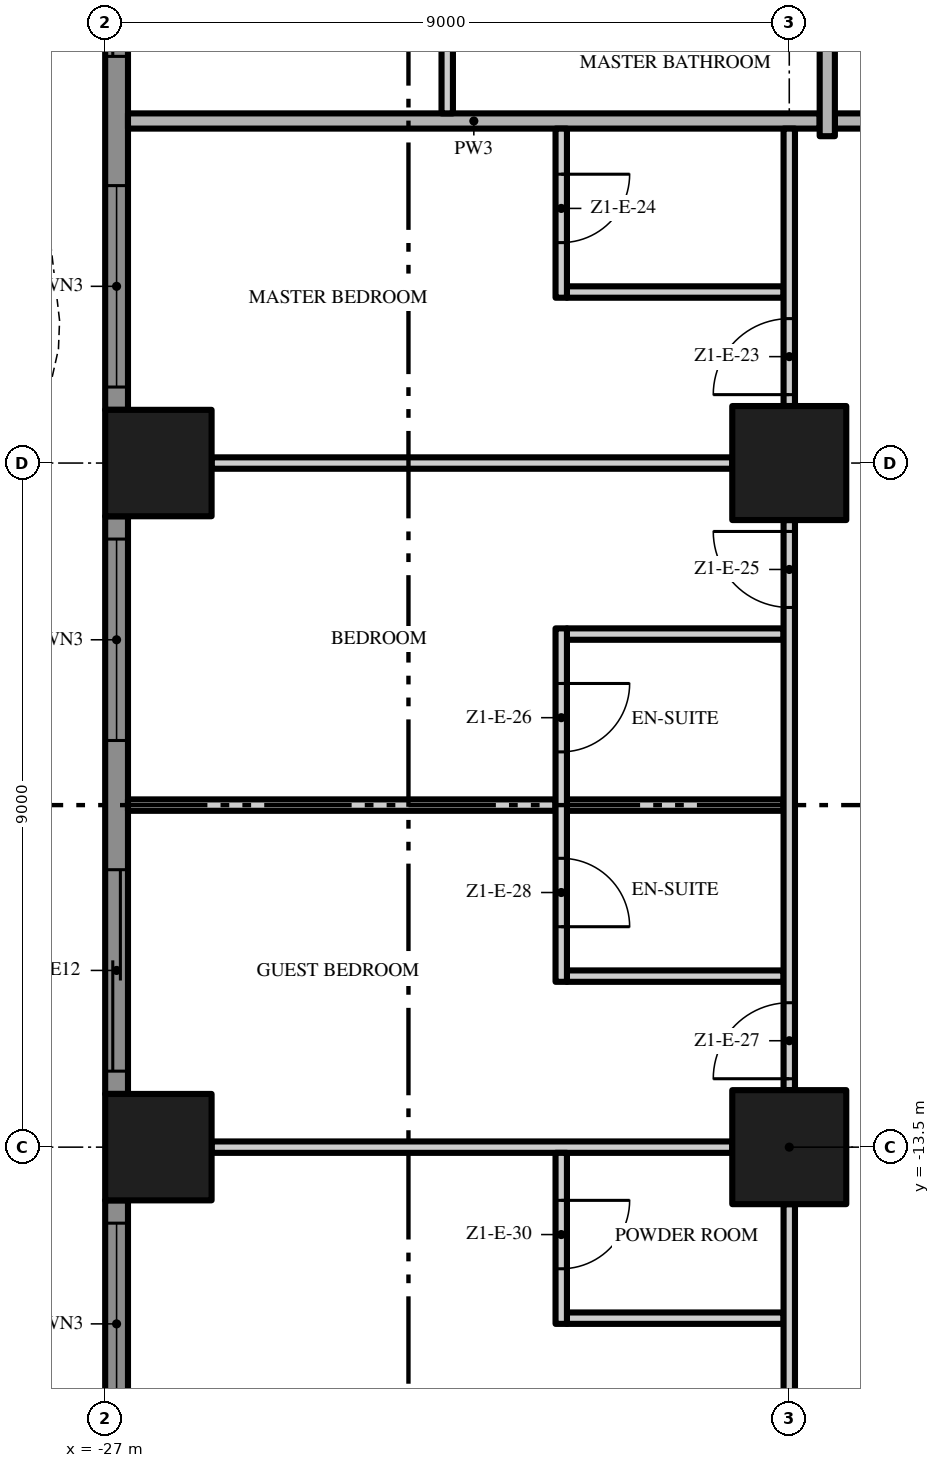
"""IFC4 building model, lengths in metres.
Left out: names, types, materials, properties, quantities, classifications, styles, units other than length and angle.
Written with IfcOpenShell. Run it as: python <this file> out.ifc"""

import sys

from ifc_helpers import new_model, si_unit, direction, frame, frame_2d, origin, origin_2d, place, context, subcontext, project, spatial, polyline, rectangle, outline, extrude, element, fill, save


model = new_model("IFC4")
c1 = context("Model", 3, precision=1e-05, world=origin(), true_north=direction((0.0, 1.0)))
c2 = subcontext(c1, "Body", "Model", "MODEL_VIEW")
j1 = project(units=[si_unit("LENGTHUNIT", "METRE"), si_unit("PLANEANGLEUNIT", "RADIAN")], contexts=[c1])
p1 = place(None, origin())
s1 = spatial("IfcSite", under=j1, at=p1, CompositionType="ELEMENT")
p2 = place(p1, origin())
s2 = spatial("IfcBuilding", under=s1, at=p2, CompositionType="ELEMENT")
p3 = place(p2, frame((0.0, 0.0, 56.8)))
s3 = spatial("IfcBuildingStorey", under=s2, at=p3, CompositionType="ELEMENT", Elevation=56.8)
for number, where, z_axis, x_axis in (
    (1, (-18.0, -13.5, 0.0), (0.0, 0.0, 1.0), (1.0, 0.0, 0.0)),
    (2, (-18.0, -4.5, 0.0), (0.0, 0.0, 1.0), (1.0, 0.0, 0.0)),
):
    element("IfcColumn", number, at=place(p3, frame(where, z_axis=z_axis, x_axis=x_axis)), inside=s3, PredefinedType="COLUMN", context=c2, shape_type="SweptSolid", body=[
        extrude(rectangle(XDim=1.5, YDim=1.5, at=origin_2d()), origin(), (0.0, 0.0, 1.0), 3.5),
    ])
for number, where, z_axis, x_axis in (
    (3, (-26.3, -13.5, 0.0), (0.0, 0.0, 1.0), (1.0, 0.0, 0.0)),
    (4, (-26.3, -4.5, 0.0), (0.0, 0.0, 1.0), (1.0, 0.0, 0.0)),
):
    element("IfcColumn", number, at=place(p3, frame(where, z_axis=z_axis, x_axis=x_axis)), inside=s3, PredefinedType="COLUMN", context=c2, shape_type="SweptSolid", body=[
        extrude(rectangle(XDim=1.4, YDim=1.4, at=origin_2d()), origin(), (0.0, 0.0, 1.0), 3.5),
    ])
p4 = place(p3, frame((-26.85, -3.8, 0.0), z_axis=(0.0, 0.0, 1.0), x_axis=(0.0, 1.0, 0.0)))
e5 = element("IfcWall", 5, at=p4, inside=s3, PredefinedType="SOLIDWALL", context=c2, shape_type="SweptSolid", body=[
    extrude(rectangle(XDim=7.6, YDim=0.3, at=frame_2d((3.8, 0.0))), origin(), (0.0, 0.0, 1.0), 3.5),
])
p5 = place(p4, frame((4.65, 0.0, 0.0)))
e6 = element("IfcOpeningElement", 6, at=p5, cuts=e5, PredefinedType="OPENING", context=c2, shape_type="SweptSolid", body=[
    extrude(rectangle(XDim=2.65, YDim=2.4, at=frame_2d((1.325, 1.2))), frame((0.0, 0.16, 0.0), z_axis=(0.0, -1.0, 0.0), x_axis=(1.0, 0.0, 0.0)), (0.0, 0.0, 1.0), 0.32),
])
p6 = place(p4, frame((0.3, 0.0, 0.45)))
e7 = element("IfcOpeningElement", 7, at=p6, cuts=e5, PredefinedType="OPENING", context=c2, shape_type="SweptSolid", body=[
    extrude(rectangle(XDim=2.65, YDim=2.65, at=frame_2d((1.325, 1.325))), frame((0.0, 0.16, 0.0), z_axis=(0.0, -1.0, 0.0), x_axis=(1.0, 0.0, 0.0)), (0.0, 0.0, 1.0), 0.32),
])
p7 = place(p3, frame((-26.85, -12.8, 0.0), z_axis=(0.0, 0.0, 1.0), x_axis=(0.0, 1.0, 0.0)))
e8 = element("IfcWall", 8, at=p7, inside=s3, PredefinedType="SOLIDWALL", context=c2, shape_type="SweptSolid", body=[
    extrude(rectangle(XDim=7.6, YDim=0.3, at=frame_2d((3.8, 0.0))), origin(), (0.0, 0.0, 1.0), 3.5),
])
p8 = place(p7, frame((4.65, 0.0, 0.45)))
e9 = element("IfcOpeningElement", 9, at=p8, cuts=e8, PredefinedType="OPENING", context=c2, shape_type="SweptSolid", body=[
    extrude(rectangle(XDim=2.65, YDim=2.65, at=frame_2d((1.325, 1.325))), frame((0.0, 0.16, 0.0), z_axis=(0.0, -1.0, 0.0), x_axis=(1.0, 0.0, 0.0)), (0.0, 0.0, 1.0), 0.32),
])
p9 = place(p7, frame((0.3, 0.0, 0.0)))
e10 = element("IfcOpeningElement", 10, at=p9, cuts=e8, PredefinedType="OPENING", context=c2, shape_type="SweptSolid", body=[
    extrude(rectangle(XDim=2.65, YDim=2.4, at=frame_2d((1.325, 1.2))), frame((0.0, 0.16, 0.0), z_axis=(0.0, -1.0, 0.0), x_axis=(1.0, 0.0, 0.0)), (0.0, 0.0, 1.0), 0.32),
])
p10 = place(p3, frame((-26.85, -18.0, 0.0), z_axis=(0.0, 0.0, 1.0), x_axis=(0.0, 1.0, 0.0)))
e11 = element("IfcWall", 11, at=p10, inside=s3, PredefinedType="SOLIDWALL", context=c2, shape_type="SweptSolid", body=[
    extrude(rectangle(XDim=3.8, YDim=0.3, at=frame_2d((1.9, 0.0))), origin(), (0.0, 0.0, 1.0), 3.5),
])
p11 = place(p10, frame((0.85, 0.0, 0.45)))
e12 = element("IfcOpeningElement", 12, at=p11, cuts=e11, PredefinedType="OPENING", context=c2, shape_type="SweptSolid", body=[
    extrude(rectangle(XDim=2.65, YDim=2.65, at=frame_2d((1.325, 1.325))), frame((0.0, 0.16, 0.0), z_axis=(0.0, -1.0, 0.0), x_axis=(1.0, 0.0, 0.0)), (0.0, 0.0, 1.0), 0.32),
])
p12 = place(p3, origin())
e13 = element("IfcWall", 13, at=p12, inside=s3, PredefinedType="USERDEFINED", context=c2, shape_type="SweptSolid", body=[
    extrude(outline(polyline([(-29.649, 18.0), (-28.988, 16.5), (-28.255, 15.0), (-27.731, 13.5), (-27.6, 12.375), (-27.615, 12.0), (-27.951, 10.5), (-28.612, 9.0), (-29.345, 7.5), (-29.869, 6.0), (-30.0, 4.875), (-29.985, 4.5), (-29.649, 3.0), (-28.988, 1.5), (-28.255, 0.0), (-27.731, -1.5), (-27.6, -2.625), (-27.615, -3.0), (-27.951, -4.5), (-28.612, -6.0), (-29.345, -7.5), (-29.869, -9.0), (-30.0, -10.125), (-29.985, -10.5), (-29.649, -12.0), (-28.988, -13.5), (-28.255, -15.0), (-27.731, -16.5), (-27.6, -17.625), (-27.615, -18.0), (-27.365, -18.01), (-27.349, -17.615), (-27.486, -16.444), (-28.024, -14.904), (-28.761, -13.395), (-29.41, -11.921), (-29.736, -10.467), (-29.749, -10.135), (-29.624, -9.056), (-29.114, -7.596), (-28.385, -6.105), (-27.713, -4.579), (-27.366, -3.033), (-27.349, -2.615), (-27.486, -1.444), (-28.024, 0.096), (-28.761, 1.605), (-29.41, 3.079), (-29.736, 4.533), (-29.749, 4.865), (-29.624, 5.944), (-29.114, 7.404), (-28.385, 8.895), (-27.713, 10.421), (-27.366, 11.967), (-27.349, 12.385), (-27.486, 13.556), (-28.024, 15.096), (-28.761, 16.605), (-29.42, 18.101), (-29.649, 18.0)])), origin(), (0.0, 0.0, 1.0), 0.9),
])
p13 = place(p3, frame((-20.925, -15.75, 0.0), z_axis=(0.0, 0.0, 1.0), x_axis=(1.0, 0.0, 0.0)))
e14 = element("IfcWall", 14, at=p13, inside=s3, PredefinedType="PARTITIONING", context=c2, shape_type="SweptSolid", body=[
    extrude(rectangle(XDim=2.85, YDim=0.15, at=frame_2d((1.425, 0.0))), origin(), (0.0, 0.0, 1.0), 3.5),
])
p14 = place(p3, frame((-25.6, -13.5, 0.0), z_axis=(0.0, 0.0, 1.0), x_axis=(1.0, 0.0, 0.0)))
e15 = element("IfcWall", 15, at=p14, inside=s3, PredefinedType="PARTITIONING", context=c2, shape_type="SweptSolid", body=[
    extrude(rectangle(XDim=6.85, YDim=0.15, at=frame_2d((3.425, 0.0))), origin(), (0.0, 0.0, 1.0), 3.5),
])
p15 = place(p3, frame((-20.925, -11.25, 0.0), z_axis=(0.0, 0.0, 1.0), x_axis=(1.0, 0.0, 0.0)))
e16 = element("IfcWall", 16, at=p15, inside=s3, PredefinedType="PARTITIONING", context=c2, shape_type="SweptSolid", body=[
    extrude(rectangle(XDim=2.85, YDim=0.15, at=frame_2d((1.425, 0.0))), origin(), (0.0, 0.0, 1.0), 3.5),
])
p16 = place(p3, frame((-26.7, -9.0, 0.0), z_axis=(0.0, 0.0, 1.0), x_axis=(1.0, 0.0, 0.0)))
e17 = element("IfcWall", 17, at=p16, inside=s3, PredefinedType="PARTITIONING", context=c2, shape_type="SweptSolid", body=[
    extrude(rectangle(XDim=5.625, YDim=0.15, at=frame_2d((2.812, 0.0))), origin(), (0.0, 0.0, 1.0), 3.5),
])
for number, where, z_axis, x_axis in (
    (18, (-20.925, -9.0, 0.0), (0.0, 0.0, 1.0), (1.0, 0.0, 0.0)),
    (19, (-20.925, -6.75, 0.0), (0.0, 0.0, 1.0), (1.0, 0.0, 0.0)),
):
    element("IfcWall", number, at=place(p3, frame(where, z_axis=z_axis, x_axis=x_axis)), inside=s3, PredefinedType="PARTITIONING", context=c2, shape_type="SweptSolid", body=[
        extrude(rectangle(XDim=2.85, YDim=0.15, at=frame_2d((1.425, 0.0))), origin(), (0.0, 0.0, 1.0), 3.5),
    ])
p17 = place(p3, frame((-25.6, -4.5, 0.0), z_axis=(0.0, 0.0, 1.0), x_axis=(1.0, 0.0, 0.0)))
e20 = element("IfcWall", 20, at=p17, inside=s3, PredefinedType="PARTITIONING", context=c2, shape_type="SweptSolid", body=[
    extrude(rectangle(XDim=6.85, YDim=0.15, at=frame_2d((3.425, 0.0))), origin(), (0.0, 0.0, 1.0), 3.5),
])
p18 = place(p3, frame((-20.925, -2.25, 0.0), z_axis=(0.0, 0.0, 1.0), x_axis=(1.0, 0.0, 0.0)))
e21 = element("IfcWall", 21, at=p18, inside=s3, PredefinedType="PARTITIONING", context=c2, shape_type="SweptSolid", body=[
    extrude(rectangle(XDim=2.85, YDim=0.15, at=frame_2d((1.425, 0.0))), origin(), (0.0, 0.0, 1.0), 3.5),
])
p19 = place(p3, frame((-17.4, 0.0, 0.0), z_axis=(0.0, 0.0, 1.0), x_axis=(1.0, 0.0, 0.0)))
e22 = element("IfcWall", 22, at=p19, inside=s3, PredefinedType="PARTITIONING", context=c2, shape_type="SweptSolid", body=[
    extrude(rectangle(XDim=12.8, YDim=0.2, at=frame_2d((6.4, 0.0))), origin(), (0.0, 0.0, 1.0), 3.5),
])
p20 = place(p3, frame((-26.7, 0.0, 0.0), z_axis=(0.0, 0.0, 1.0), x_axis=(1.0, 0.0, 0.0)))
e23 = element("IfcWall", 23, at=p20, inside=s3, PredefinedType="PARTITIONING", context=c2, shape_type="SweptSolid", body=[
    extrude(rectangle(XDim=9.1, YDim=0.2, at=frame_2d((4.55, 0.0))), origin(), (0.0, 0.0, 1.0), 3.5),
])
p21 = place(p3, frame((-22.5, 0.1, 0.0), z_axis=(0.0, 0.0, 1.0), x_axis=(0.0, 1.0, 0.0)))
e24 = element("IfcWall", 24, at=p21, inside=s3, PredefinedType="PARTITIONING", context=c2, shape_type="SweptSolid", body=[
    extrude(rectangle(XDim=17.2, YDim=0.15, at=frame_2d((8.6, 0.0))), origin(), (0.0, 0.0, 1.0), 3.5),
])
p22 = place(p21, frame((1.65, 0.0, 0.0)))
e25 = element("IfcOpeningElement", 25, at=p22, cuts=e24, PredefinedType="OPENING", context=c2, shape_type="SweptSolid", body=[
    extrude(rectangle(XDim=1.0, YDim=2.4, at=frame_2d((0.5, 1.2))), frame((0.0, 0.085, 0.0), z_axis=(0.0, -1.0, 0.0), x_axis=(1.0, 0.0, 0.0)), (0.0, 0.0, 1.0), 0.17),
])
p23 = place(p21, frame((5.0, 0.0, 0.0)))
e26 = element("IfcOpeningElement", 26, at=p23, cuts=e24, PredefinedType="OPENING", context=c2, shape_type="SweptSolid", body=[
    extrude(rectangle(XDim=1.0, YDim=2.4, at=frame_2d((0.5, 1.2))), frame((0.0, 0.085, 0.0), z_axis=(0.0, -1.0, 0.0), x_axis=(1.0, 0.0, 0.0)), (0.0, 0.0, 1.0), 0.17),
])
p24 = place(p21, frame((13.25, 0.0, 0.0)))
e27 = element("IfcOpeningElement", 27, at=p24, cuts=e24, PredefinedType="OPENING", context=c2, shape_type="SweptSolid", body=[
    extrude(rectangle(XDim=1.8, YDim=2.4, at=frame_2d((0.9, 1.2))), frame((0.0, 0.085, 0.0), z_axis=(0.0, -1.0, 0.0), x_axis=(1.0, 0.0, 0.0)), (0.0, 0.0, 1.0), 0.17),
])
p25 = place(p3, frame((-21.0, -13.575, 0.0), z_axis=(0.0, 0.0, 1.0), x_axis=(0.0, -1.0, 0.0)))
e28 = element("IfcWall", 28, at=p25, inside=s3, PredefinedType="PARTITIONING", context=c2, shape_type="SweptSolid", body=[
    extrude(rectangle(XDim=2.25, YDim=0.15, at=frame_2d((1.125, 0.0))), origin(), (0.0, 0.0, 1.0), 3.5),
])
p26 = place(p25, frame((0.625, 0.0, 0.0)))
e29 = element("IfcOpeningElement", 29, at=p26, cuts=e28, PredefinedType="OPENING", context=c2, shape_type="SweptSolid", body=[
    extrude(rectangle(XDim=0.9, YDim=2.1, at=frame_2d((0.45, 1.05))), frame((0.0, 0.085, 0.0), z_axis=(0.0, -1.0, 0.0), x_axis=(1.0, 0.0, 0.0)), (0.0, 0.0, 1.0), 0.17),
])
p27 = place(p3, frame((-21.0, -6.675, 0.0), z_axis=(0.0, 0.0, 1.0), x_axis=(0.0, -1.0, 0.0)))
e30 = element("IfcWall", 30, at=p27, inside=s3, PredefinedType="PARTITIONING", context=c2, shape_type="SweptSolid", body=[
    extrude(rectangle(XDim=4.65, YDim=0.15, at=frame_2d((2.325, 0.0))), origin(), (0.0, 0.0, 1.0), 3.5),
])
p28 = place(p27, frame((0.725, 0.0, 0.0)))
e31 = element("IfcOpeningElement", 31, at=p28, cuts=e30, PredefinedType="OPENING", context=c2, shape_type="SweptSolid", body=[
    extrude(rectangle(XDim=0.9, YDim=2.1, at=frame_2d((0.45, 1.05))), frame((0.0, 0.085, 0.0), z_axis=(0.0, -1.0, 0.0), x_axis=(1.0, 0.0, 0.0)), (0.0, 0.0, 1.0), 0.17),
])
p29 = place(p27, frame((3.025, 0.0, 0.0)))
e32 = element("IfcOpeningElement", 32, at=p29, cuts=e30, PredefinedType="OPENING", context=c2, shape_type="SweptSolid", body=[
    extrude(rectangle(XDim=0.9, YDim=2.1, at=frame_2d((0.45, 1.05))), frame((0.0, 0.085, 0.0), z_axis=(0.0, -1.0, 0.0), x_axis=(1.0, 0.0, 0.0)), (0.0, 0.0, 1.0), 0.17),
])
p30 = place(p3, frame((-21.0, -0.1, 0.0), z_axis=(0.0, 0.0, 1.0), x_axis=(0.0, -1.0, 0.0)))
e33 = element("IfcWall", 33, at=p30, inside=s3, PredefinedType="PARTITIONING", context=c2, shape_type="SweptSolid", body=[
    extrude(rectangle(XDim=2.225, YDim=0.15, at=frame_2d((1.113, 0.0))), origin(), (0.0, 0.0, 1.0), 3.5),
])
p31 = place(p30, frame((0.6, 0.0, 0.0)))
e34 = element("IfcOpeningElement", 34, at=p31, cuts=e33, PredefinedType="OPENING", context=c2, shape_type="SweptSolid", body=[
    extrude(rectangle(XDim=0.9, YDim=2.1, at=frame_2d((0.45, 1.05))), frame((0.0, 0.085, 0.0), z_axis=(0.0, -1.0, 0.0), x_axis=(1.0, 0.0, 0.0)), (0.0, 0.0, 1.0), 0.17),
])
p32 = place(p3, frame((-18.0, -21.1, 0.0), z_axis=(0.0, 0.0, 1.0), x_axis=(0.0, 1.0, 0.0)))
e35 = element("IfcWall", 35, at=p32, inside=s3, PredefinedType="PARTITIONING", context=c2, shape_type="SweptSolid", body=[
    extrude(rectangle(XDim=6.85, YDim=0.15, at=frame_2d((3.425, 0.0))), origin(), (0.0, 0.0, 1.0), 3.5),
])
p33 = place(p32, frame((1.1, 0.0, 0.0)))
e36 = element("IfcOpeningElement", 36, at=p33, cuts=e35, PredefinedType="OPENING", context=c2, shape_type="SweptSolid", body=[
    extrude(rectangle(XDim=1.8, YDim=2.4, at=frame_2d((0.9, 1.2))), frame((0.0, 0.085, 0.0), z_axis=(0.0, -1.0, 0.0), x_axis=(1.0, 0.0, 0.0)), (0.0, 0.0, 1.0), 0.17),
])
p34 = place(p3, frame((-18.0, -12.75, 0.0), z_axis=(0.0, 0.0, 1.0), x_axis=(0.0, 1.0, 0.0)))
e37 = element("IfcWall", 37, at=p34, inside=s3, PredefinedType="PARTITIONING", context=c2, shape_type="SweptSolid", body=[
    extrude(rectangle(XDim=7.5, YDim=0.15, at=frame_2d((3.75, 0.0))), origin(), (0.0, 0.0, 1.0), 3.5),
])
p35 = place(p34, frame((6.35, 0.0, 0.0)))
e38 = element("IfcOpeningElement", 38, at=p35, cuts=e37, PredefinedType="OPENING", context=c2, shape_type="SweptSolid", body=[
    extrude(rectangle(XDim=1.0, YDim=2.4, at=frame_2d((0.5, 1.2))), frame((0.0, 0.085, 0.0), z_axis=(0.0, -1.0, 0.0), x_axis=(1.0, 0.0, 0.0)), (0.0, 0.0, 1.0), 0.17),
])
p36 = place(p34, frame((0.15, 0.0, 0.0)))
e39 = element("IfcOpeningElement", 39, at=p36, cuts=e37, PredefinedType="OPENING", context=c2, shape_type="SweptSolid", body=[
    extrude(rectangle(XDim=1.0, YDim=2.4, at=frame_2d((0.5, 1.2))), frame((0.0, 0.085, 0.0), z_axis=(0.0, -1.0, 0.0), x_axis=(1.0, 0.0, 0.0)), (0.0, 0.0, 1.0), 0.17),
])
p37 = place(p3, frame((-18.0, -3.75, 0.0), z_axis=(0.0, 0.0, 1.0), x_axis=(0.0, 1.0, 0.0)))
e40 = element("IfcWall", 40, at=p37, inside=s3, PredefinedType="PARTITIONING", context=c2, shape_type="SweptSolid", body=[
    extrude(rectangle(XDim=3.65, YDim=0.15, at=frame_2d((1.825, 0.0))), origin(), (0.0, 0.0, 1.0), 3.5),
])
p38 = place(p37, frame((0.15, 0.0, 0.0)))
e41 = element("IfcOpeningElement", 41, at=p38, cuts=e40, PredefinedType="OPENING", context=c2, shape_type="SweptSolid", body=[
    extrude(rectangle(XDim=1.0, YDim=2.4, at=frame_2d((0.5, 1.2))), frame((0.0, 0.085, 0.0), z_axis=(0.0, -1.0, 0.0), x_axis=(1.0, 0.0, 0.0)), (0.0, 0.0, 1.0), 0.17),
])
p39 = place(p3, frame((-17.5, -0.2, 0.0), z_axis=(0.0, 0.0, 1.0), x_axis=(0.0, 1.0, 0.0)))
e42 = element("IfcWall", 42, at=p39, inside=s3, PredefinedType="PARTITIONING", context=c2, shape_type="SweptSolid", body=[
    extrude(rectangle(XDim=3.95, YDim=0.2, at=frame_2d((1.975, 0.0))), origin(), (0.0, 0.0, 1.0), 3.5),
])
p40 = place(p5, origin())
e43 = element("IfcDoor", 43, at=p40, inside=s3, OperationType="SINGLE_SWING_LEFT", PredefinedType="DOOR", context=c2, shape_type="SweptSolid", body=[
    extrude(rectangle(XDim=2.65, YDim=2.4, at=frame_2d((1.325, 1.2))), frame((0.0, 0.025, 0.0), z_axis=(0.0, -1.0, 0.0), x_axis=(1.0, 0.0, 0.0)), (0.0, 0.0, 1.0), 0.05),
])
fill(e6, e43)
p41 = place(p6, origin())
e44 = element("IfcWindow", 44, at=p41, inside=s3, PartitioningType="SINGLE_PANEL", PredefinedType="WINDOW", context=c2, shape_type="SweptSolid", body=[
    extrude(rectangle(XDim=2.65, YDim=2.65, at=frame_2d((1.325, 1.325))), frame((0.0, 0.03, 0.0), z_axis=(0.0, -1.0, 0.0), x_axis=(1.0, 0.0, 0.0)), (0.0, 0.0, 1.0), 0.06),
])
fill(e7, e44)
p42 = place(p8, origin())
e45 = element("IfcWindow", 45, at=p42, inside=s3, PartitioningType="SINGLE_PANEL", PredefinedType="WINDOW", context=c2, shape_type="SweptSolid", body=[
    extrude(rectangle(XDim=2.65, YDim=2.65, at=frame_2d((1.325, 1.325))), frame((0.0, 0.03, 0.0), z_axis=(0.0, -1.0, 0.0), x_axis=(1.0, 0.0, 0.0)), (0.0, 0.0, 1.0), 0.06),
])
fill(e9, e45)
p43 = place(p9, origin())
e46 = element("IfcDoor", 46, at=p43, inside=s3, OperationType="SINGLE_SWING_LEFT", PredefinedType="DOOR", context=c2, shape_type="SweptSolid", body=[
    extrude(rectangle(XDim=2.65, YDim=2.4, at=frame_2d((1.325, 1.2))), frame((0.0, 0.025, 0.0), z_axis=(0.0, -1.0, 0.0), x_axis=(1.0, 0.0, 0.0)), (0.0, 0.0, 1.0), 0.05),
])
fill(e10, e46)
p44 = place(p11, origin())
e47 = element("IfcWindow", 47, at=p44, inside=s3, PartitioningType="SINGLE_PANEL", PredefinedType="WINDOW", context=c2, shape_type="SweptSolid", body=[
    extrude(rectangle(XDim=2.65, YDim=2.65, at=frame_2d((1.325, 1.325))), frame((0.0, 0.03, 0.0), z_axis=(0.0, -1.0, 0.0), x_axis=(1.0, 0.0, 0.0)), (0.0, 0.0, 1.0), 0.06),
])
fill(e12, e47)
p45 = place(p38, origin())
e48 = element("IfcDoor", 48, at=p45, inside=s3, OperationType="SINGLE_SWING_LEFT", PredefinedType="DOOR", context=c2, shape_type="SweptSolid", body=[
    extrude(rectangle(XDim=1.0, YDim=2.4, at=frame_2d((0.5, 1.2))), frame((0.0, 0.025, 0.0), z_axis=(0.0, -1.0, 0.0), x_axis=(1.0, 0.0, 0.0)), (0.0, 0.0, 1.0), 0.05),
])
fill(e41, e48)
p46 = place(p31, origin())
e49 = element("IfcDoor", 49, at=p46, inside=s3, OperationType="SINGLE_SWING_LEFT", PredefinedType="DOOR", context=c2, shape_type="SweptSolid", body=[
    extrude(rectangle(XDim=0.9, YDim=2.1, at=frame_2d((0.45, 1.05))), frame((0.0, 0.025, 0.0), z_axis=(0.0, -1.0, 0.0), x_axis=(1.0, 0.0, 0.0)), (0.0, 0.0, 1.0), 0.05),
])
fill(e34, e49)
p47 = place(p35, origin())
e50 = element("IfcDoor", 50, at=p47, inside=s3, OperationType="SINGLE_SWING_RIGHT", PredefinedType="DOOR", context=c2, shape_type="SweptSolid", body=[
    extrude(rectangle(XDim=1.0, YDim=2.4, at=frame_2d((0.5, 1.2))), frame((0.0, 0.025, 0.0), z_axis=(0.0, -1.0, 0.0), x_axis=(1.0, 0.0, 0.0)), (0.0, 0.0, 1.0), 0.05),
])
fill(e38, e50)
p48 = place(p28, origin())
e51 = element("IfcDoor", 51, at=p48, inside=s3, OperationType="SINGLE_SWING_LEFT", PredefinedType="DOOR", context=c2, shape_type="SweptSolid", body=[
    extrude(rectangle(XDim=0.9, YDim=2.1, at=frame_2d((0.45, 1.05))), frame((0.0, 0.025, 0.0), z_axis=(0.0, -1.0, 0.0), x_axis=(1.0, 0.0, 0.0)), (0.0, 0.0, 1.0), 0.05),
])
fill(e31, e51)
p49 = place(p36, origin())
e52 = element("IfcDoor", 52, at=p49, inside=s3, OperationType="SINGLE_SWING_LEFT", PredefinedType="DOOR", context=c2, shape_type="SweptSolid", body=[
    extrude(rectangle(XDim=1.0, YDim=2.4, at=frame_2d((0.5, 1.2))), frame((0.0, 0.025, 0.0), z_axis=(0.0, -1.0, 0.0), x_axis=(1.0, 0.0, 0.0)), (0.0, 0.0, 1.0), 0.05),
])
fill(e39, e52)
p50 = place(p29, origin())
e53 = element("IfcDoor", 53, at=p50, inside=s3, OperationType="SINGLE_SWING_RIGHT", PredefinedType="DOOR", context=c2, shape_type="SweptSolid", body=[
    extrude(rectangle(XDim=0.9, YDim=2.1, at=frame_2d((0.45, 1.05))), frame((0.0, 0.025, 0.0), z_axis=(0.0, -1.0, 0.0), x_axis=(1.0, 0.0, 0.0)), (0.0, 0.0, 1.0), 0.05),
])
fill(e32, e53)
p51 = place(p26, origin())
e54 = element("IfcDoor", 54, at=p51, inside=s3, OperationType="SINGLE_SWING_LEFT", PredefinedType="DOOR", context=c2, shape_type="SweptSolid", body=[
    extrude(rectangle(XDim=0.9, YDim=2.1, at=frame_2d((0.45, 1.05))), frame((0.0, 0.025, 0.0), z_axis=(0.0, -1.0, 0.0), x_axis=(1.0, 0.0, 0.0)), (0.0, 0.0, 1.0), 0.05),
])
fill(e29, e54)
save(model, sys.argv[1])
